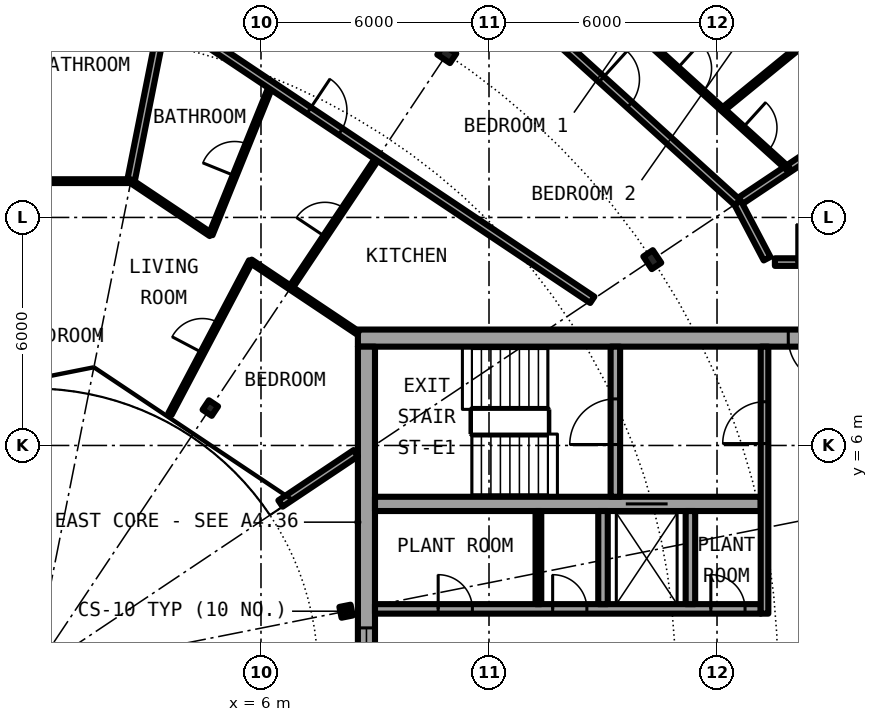
"""IFC4 building model, lengths in metres.
Left out: names, types, materials, properties, quantities, classifications, styles, units other than length and angle.
Written with IfcOpenShell. Run it as: python <this file> out.ifc"""

import sys

from ifc_helpers import new_model, si_unit, direction, frame, frame_2d, origin, origin_2d, place, context, subcontext, project, spatial, rectangle, i_section, extrude, element, fill, save


model = new_model("IFC4")
c1 = context("Model", 3, precision=1e-05, world=origin(), true_north=direction((0.0, 1.0)))
c2 = subcontext(c1, "Body", "Model", "MODEL_VIEW")
j1 = project(units=[si_unit("LENGTHUNIT", "METRE"), si_unit("PLANEANGLEUNIT", "RADIAN")], contexts=[c1])
p1 = place(None, origin())
s1 = spatial("IfcSite", under=j1, at=p1, CompositionType="ELEMENT")
p2 = place(p1, origin())
s2 = spatial("IfcBuilding", under=s1, at=p2, CompositionType="ELEMENT")
p3 = place(p2, frame((0.0, 0.0, 196.3)))
s3 = spatial("IfcBuildingStorey", under=s2, at=p3, CompositionType="ELEMENT", Elevation=196.3)
for number, where, z_axis, x_axis in (
    (1, (16.297, 10.889, 0.0), (0.0, 0.0, 1.0), (0.831, 0.556, 0.0)),
    (2, (10.889, 16.297, 0.0), (0.0, 0.0, 1.0), (0.556, 0.831, 0.0)),
):
    element("IfcColumn", number, at=place(p3, frame(where, z_axis=z_axis, x_axis=x_axis)), inside=s3, PredefinedType="COLUMN", context=c2, shape_type="SweptSolid", body=[
        extrude(i_section(OverallWidth=0.3, OverallDepth=0.4, WebThickness=0.013, FlangeThickness=0.024, FilletRadius=0.027, at=origin_2d()), origin(), (0.0, 0.0, 1.0), 3.05),
    ])
for number, where, z_axis, x_axis in (
    (3, (8.239, 1.639, 0.0), (0.0, 0.0, 1.0), (0.981, 0.195, 0.0)),
    (4, (4.667, 6.984, 0.0), (0.0, 0.0, 1.0), (0.556, 0.831, 0.0)),
):
    element("IfcColumn", number, at=place(p3, frame(where, z_axis=z_axis, x_axis=x_axis)), inside=s3, PredefinedType="COLUMN", context=c2, shape_type="SweptSolid", body=[
        extrude(i_section(OverallWidth=0.3, OverallDepth=0.29, WebThickness=0.009, FlangeThickness=0.014, FilletRadius=0.027, at=origin_2d()), origin(), (0.0, 0.0, 1.0), 3.05),
    ])
p4 = place(p3, frame((22.699, 15.167, 0.0), z_axis=(0.0, 0.0, 1.0), x_axis=(-0.634382322723, 0.773019449054, 0.0)))
e5 = element("IfcWall", 5, at=p4, inside=s3, PredefinedType="SOLIDWALL", context=c2, shape_type="SweptSolid", body=[
    extrude(rectangle(XDim=5.352, YDim=0.25, at=frame_2d((2.676, 0.0))), origin(), (0.0, 0.0, 1.0), 2.7),
])
p5 = place(p4, frame((0.841, 0.0, 0.0)))
e6 = element("IfcOpeningElement", 6, at=p5, cuts=e5, PredefinedType="OPENING", context=c2, shape_type="SweptSolid", body=[
    extrude(rectangle(XDim=1.0, YDim=2.2, at=frame_2d((0.5, 1.1))), frame((0.0, 0.135, 0.0), z_axis=(0.0, -1.0, 0.0), x_axis=(1.0, 0.0, 0.0)), (0.0, 0.0, 1.0), 0.27),
])
p6 = place(p4, frame((3.111, 0.0, 0.3)))
e7 = element("IfcOpeningElement", 7, at=p6, cuts=e5, PredefinedType="OPENING", context=c2, shape_type="SweptSolid", body=[
    extrude(rectangle(XDim=1.8, YDim=2.1, at=frame_2d((0.9, 1.05))), frame((0.0, 0.135, 0.0), z_axis=(0.0, -1.0, 0.0), x_axis=(1.0, 0.0, 0.0)), (0.0, 0.0, 1.0), 0.27),
])
p7 = place(p3, frame((22.05, 8.825, 0.0), z_axis=(0.0, 0.0, 1.0), x_axis=(-1.0, 0.0, 0.0)))
e8 = element("IfcWall", 8, at=p7, inside=s3, PredefinedType="SHEAR", context=c2, shape_type="SweptSolid", body=[
    extrude(rectangle(XDim=13.5, YDim=0.45, at=frame_2d((6.75, 0.0))), origin(), (0.0, 0.0, 1.0), 3.05),
])
p8 = place(p7, frame((0.975, 0.0, 0.0)))
e9 = element("IfcOpeningElement", 9, at=p8, cuts=e8, PredefinedType="OPENING", context=c2, shape_type="SweptSolid", body=[
    extrude(rectangle(XDim=1.2, YDim=2.3, at=frame_2d((0.6, 1.15))), frame((0.0, 0.235, 0.0), z_axis=(0.0, -1.0, 0.0), x_axis=(1.0, 0.0, 0.0)), (0.0, 0.0, 1.0), 0.47),
])
p9 = place(p3, frame((8.775, -8.6, 0.0), z_axis=(0.0, 0.0, 1.0), x_axis=(0.0, 1.0, 0.0)))
e10 = element("IfcWall", 10, at=p9, inside=s3, PredefinedType="SHEAR", context=c2, shape_type="SweptSolid", body=[
    extrude(rectangle(XDim=17.2, YDim=0.45, at=frame_2d((8.6, 0.0))), origin(), (0.0, 0.0, 1.0), 3.05),
])
p10 = place(p9, frame((7.4, 0.0, 0.1)))
e11 = element("IfcOpeningElement", 11, at=p10, cuts=e10, PredefinedType="OPENING", context=c2, shape_type="SweptSolid", body=[
    extrude(rectangle(XDim=2.4, YDim=2.2, at=frame_2d((1.2, 1.1))), frame((0.0, 0.235, 0.0), z_axis=(0.0, -1.0, 0.0), x_axis=(1.0, 0.0, 0.0)), (0.0, 0.0, 1.0), 0.47),
])
p11 = place(p3, frame((9.0, 1.7, 0.0), z_axis=(0.0, 0.0, 1.0), x_axis=(1.0, 0.0, 0.0)))
e12 = element("IfcWall", 12, at=p11, inside=s3, PredefinedType="SHEAR", context=c2, shape_type="SweptSolid", body=[
    extrude(rectangle(XDim=10.15, YDim=0.25, at=frame_2d((5.075, 0.0))), origin(), (0.0, 0.0, 1.0), 3.05),
])
p12 = place(p11, frame((1.663, 0.0, 0.0)))
e13 = element("IfcOpeningElement", 13, at=p12, cuts=e12, PredefinedType="OPENING", context=c2, shape_type="SweptSolid", body=[
    extrude(rectangle(XDim=0.9, YDim=2.3, at=frame_2d((0.45, 1.15))), frame((0.0, 0.135, 0.0), z_axis=(0.0, -1.0, 0.0), x_axis=(1.0, 0.0, 0.0)), (0.0, 0.0, 1.0), 0.27),
])
p13 = place(p11, frame((4.675, 0.0, 0.0)))
e14 = element("IfcOpeningElement", 14, at=p13, cuts=e12, PredefinedType="OPENING", context=c2, shape_type="SweptSolid", body=[
    extrude(rectangle(XDim=0.9, YDim=2.3, at=frame_2d((0.45, 1.15))), frame((0.0, 0.135, 0.0), z_axis=(0.0, -1.0, 0.0), x_axis=(1.0, 0.0, 0.0)), (0.0, 0.0, 1.0), 0.27),
])
p14 = place(p11, frame((8.837, 0.0, 0.0)))
e15 = element("IfcOpeningElement", 15, at=p14, cuts=e12, PredefinedType="OPENING", context=c2, shape_type="SweptSolid", body=[
    extrude(rectangle(XDim=0.9, YDim=2.3, at=frame_2d((0.45, 1.15))), frame((0.0, 0.135, 0.0), z_axis=(0.0, -1.0, 0.0), x_axis=(1.0, 0.0, 0.0)), (0.0, 0.0, 1.0), 0.27),
])
p15 = place(p3, frame((9.0, 4.462, 0.0), z_axis=(0.0, 0.0, 1.0), x_axis=(1.0, 0.0, 0.0)))
e16 = element("IfcWall", 16, at=p15, inside=s3, PredefinedType="SHEAR", context=c2, shape_type="SweptSolid", body=[
    extrude(rectangle(XDim=10.15, YDim=0.375, at=frame_2d((5.075, 0.0))), origin(), (0.0, 0.0, 1.0), 3.05),
])
p16 = place(p15, frame((6.6, 0.0, 0.0)))
e17 = element("IfcOpeningElement", 17, at=p16, cuts=e16, PredefinedType="OPENING", context=c2, shape_type="SweptSolid", body=[
    extrude(rectangle(XDim=1.1, YDim=2.3, at=frame_2d((0.55, 1.15))), frame((0.0, 0.198, 0.0), z_axis=(0.0, -1.0, 0.0), x_axis=(1.0, 0.0, 0.0)), (0.0, 0.0, 1.0), 0.395),
])
p17 = place(p3, frame((15.325, 4.65, 0.0), z_axis=(0.0, 0.0, 1.0), x_axis=(0.0, 1.0, 0.0)))
e18 = element("IfcWall", 18, at=p17, inside=s3, PredefinedType="SHEAR", context=c2, shape_type="SweptSolid", body=[
    extrude(rectangle(XDim=3.95, YDim=0.25, at=frame_2d((1.975, 0.0))), origin(), (0.0, 0.0, 1.0), 3.05),
])
p18 = place(p17, frame((1.375, 0.0, 0.0)))
e19 = element("IfcOpeningElement", 19, at=p18, cuts=e18, PredefinedType="OPENING", context=c2, shape_type="SweptSolid", body=[
    extrude(rectangle(XDim=1.2, YDim=2.3, at=frame_2d((0.6, 1.15))), frame((0.0, 0.135, 0.0), z_axis=(0.0, -1.0, 0.0), x_axis=(1.0, 0.0, 0.0)), (0.0, 0.0, 1.0), 0.27),
])
for number, where, z_axis, x_axis in (
    (20, (15.0, 1.825, 0.0), (0.0, 0.0, 1.0), (0.0, 1.0, 0.0)),
    (21, (17.3, 1.825, 0.0), (0.0, 0.0, 1.0), (0.0, 1.0, 0.0)),
):
    element("IfcWall", number, at=place(p3, frame(where, z_axis=z_axis, x_axis=x_axis)), inside=s3, PredefinedType="SOLIDWALL", context=c2, shape_type="SweptSolid", body=[
        extrude(rectangle(XDim=2.45, YDim=0.25, at=frame_2d((1.225, 0.0))), origin(), (0.0, 0.0, 1.0), 2.7),
    ])
p19 = place(p3, frame((19.25, 1.575, 0.0), z_axis=(0.0, 0.0, 1.0), x_axis=(0.0, 1.0, 0.0)))
e22 = element("IfcWall", 22, at=p19, inside=s3, PredefinedType="SOLIDWALL", context=c2, shape_type="SweptSolid", body=[
    extrude(rectangle(XDim=7.025, YDim=0.2, at=frame_2d((3.513, 0.0))), origin(), (0.0, 0.0, 1.0), 2.7),
])
p20 = place(p19, frame((4.475, 0.0, 0.0)))
e23 = element("IfcOpeningElement", 23, at=p20, cuts=e22, PredefinedType="OPENING", context=c2, shape_type="SweptSolid", body=[
    extrude(rectangle(XDim=1.1, YDim=2.3, at=frame_2d((0.55, 1.15))), frame((0.0, 0.11, 0.0), z_axis=(0.0, -1.0, 0.0), x_axis=(1.0, 0.0, 0.0)), (0.0, 0.0, 1.0), 0.22),
])
p21 = place(p3, frame((13.3, 1.825, 0.0), z_axis=(0.0, 0.0, 1.0), x_axis=(0.0, 1.0, 0.0)))
e24 = element("IfcWall", 24, at=p21, inside=s3, PredefinedType="PARTITIONING", context=c2, shape_type="SweptSolid", body=[
    extrude(rectangle(XDim=2.45, YDim=0.15, at=frame_2d((1.225, 0.0))), origin(), (0.0, 0.0, 1.0), 2.7),
])
p22 = place(p3, frame((2.577, 12.955, 0.0), z_axis=(0.0, 0.0, 1.0), x_axis=(0.195039294963, 0.980795428935, 0.0)))
e25 = element("IfcWall", 25, at=p22, inside=s3, PredefinedType="PARTITIONING", context=c2, shape_type="SweptSolid", body=[
    extrude(rectangle(XDim=4.491, YDim=0.2, at=frame_2d((2.246, 0.0))), origin(), (0.0, 0.0, 1.0), 2.7),
])
p23 = place(p3, frame((3.605, 6.827, 0.0), z_axis=(0.0, 0.0, 1.0), x_axis=(0.466962677975, 0.884277025246, 0.0)))
e26 = element("IfcWall", 26, at=p23, inside=s3, PredefinedType="PARTITIONING", context=c2, shape_type="SweptSolid", body=[
    extrude(rectangle(XDim=4.549, YDim=0.1, at=frame_2d((2.274, 0.0))), origin(), (0.0, 0.0, 1.0), 2.7),
])
p24 = place(p23, frame((1.824, 0.0, 0.0)))
e27 = element("IfcOpeningElement", 27, at=p24, cuts=e26, PredefinedType="OPENING", context=c2, shape_type="SweptSolid", body=[
    extrude(rectangle(XDim=0.9, YDim=2.3, at=frame_2d((0.45, 1.15))), frame((0.0, 0.06, 0.0), z_axis=(0.0, -1.0, 0.0), x_axis=(1.0, 0.0, 0.0)), (0.0, 0.0, 1.0), 0.12),
])
p25 = place(p3, frame((4.678, 11.551, 0.0), z_axis=(0.0, 0.0, 1.0), x_axis=(0.375509828455, 0.926818411952, 0.0)))
e28 = element("IfcWall", 28, at=p25, inside=s3, PredefinedType="PARTITIONING", context=c2, shape_type="SweptSolid", body=[
    extrude(rectangle(XDim=4.237, YDim=0.1, at=frame_2d((2.119, 0.0))), origin(), (0.0, 0.0, 1.0), 2.7),
])
p26 = place(p25, frame((1.669, 0.0, 0.0)))
e29 = element("IfcOpeningElement", 29, at=p26, cuts=e28, PredefinedType="OPENING", context=c2, shape_type="SweptSolid", body=[
    extrude(rectangle(XDim=0.9, YDim=2.3, at=frame_2d((0.45, 1.15))), frame((0.0, 0.06, 0.0), z_axis=(0.0, -1.0, 0.0), x_axis=(1.0, 0.0, 0.0)), (0.0, 0.0, 1.0), 0.12),
])
p27 = place(p3, frame((6.78, 10.147, 0.0), z_axis=(0.0, 0.0, 1.0), x_axis=(0.555528237031, 0.831497671591, 0.0)))
e30 = element("IfcWall", 30, at=p27, inside=s3, PredefinedType="PARTITIONING", context=c2, shape_type="SweptSolid", body=[
    extrude(rectangle(XDim=4.149, YDim=0.1, at=frame_2d((2.075, 0.0))), origin(), (0.0, 0.0, 1.0), 2.7),
])
p28 = place(p27, frame((1.625, 0.0, 0.0)))
e31 = element("IfcOpeningElement", 31, at=p28, cuts=e30, PredefinedType="OPENING", context=c2, shape_type="SweptSolid", body=[
    extrude(rectangle(XDim=0.9, YDim=2.3, at=frame_2d((0.45, 1.15))), frame((0.0, 0.06, 0.0), z_axis=(0.0, -1.0, 0.0), x_axis=(1.0, 0.0, 0.0)), (0.0, 0.0, 1.0), 0.12),
])
p29 = place(p3, frame((18.151, 14.838, 0.0), z_axis=(0.0, 0.0, 1.0), x_axis=(0.774321581607, 0.63279229472, 0.0)))
e32 = element("IfcWall", 32, at=p29, inside=s3, PredefinedType="PARTITIONING", context=c2, shape_type="SweptSolid", body=[
    extrude(rectangle(XDim=3.731, YDim=0.1, at=frame_2d((1.866, 0.0))), origin(), (0.0, 0.0, 1.0), 2.7),
])
p30 = place(p3, frame((18.542, 12.389, 0.0), z_axis=(0.0, 0.0, 1.0), x_axis=(0.831387096605, 0.55569370664, 0.0)))
e33 = element("IfcWall", 33, at=p30, inside=s3, PredefinedType="PARTITIONING", context=c2, shape_type="SweptSolid", body=[
    extrude(rectangle(XDim=4.875, YDim=0.2, at=frame_2d((2.438, 0.0))), origin(), (0.0, 0.0, 1.0), 2.7),
])
p31 = place(p3, frame((6.513, 4.472, 0.0), z_axis=(0.0, 0.0, 1.0), x_axis=(0.831403409976, 0.555669299026, 0.0)))
e34 = element("IfcWall", 34, at=p31, inside=s3, PredefinedType="PARTITIONING", context=c2, shape_type="SweptSolid", body=[
    extrude(rectangle(XDim=2.383, YDim=0.2, at=frame_2d((1.191, 0.0))), origin(), (0.0, 0.0, 1.0), 2.7),
])
p32 = place(p3, frame((19.523, 10.825, 0.0), z_axis=(0.0, 0.0, 1.0), x_axis=(1.0, 0.0, 0.0)))
e35 = element("IfcWall", 35, at=p32, inside=s3, PredefinedType="PARTITIONING", context=c2, shape_type="SweptSolid", body=[
    extrude(rectangle(XDim=2.152, YDim=0.2, at=frame_2d((1.076, 0.0))), origin(), (0.0, 0.0, 1.0), 2.7),
])
p33 = place(p32, frame((0.576, 0.0, 0.0)))
e36 = element("IfcOpeningElement", 36, at=p33, cuts=e35, PredefinedType="OPENING", context=c2, shape_type="SweptSolid", body=[
    extrude(rectangle(XDim=1.0, YDim=2.3, at=frame_2d((0.5, 1.15))), frame((0.0, 0.11, 0.0), z_axis=(0.0, -1.0, 0.0), x_axis=(1.0, 0.0, 0.0)), (0.0, 0.0, 1.0), 0.22),
])
p34 = place(p3, frame((2.577, 12.955, 0.0), z_axis=(0.0, 0.0, 1.0), x_axis=(0.831440395268, -0.555613956912, 0.0)))
e37 = element("IfcWall", 37, at=p34, inside=s3, PredefinedType="PARTITIONING", context=c2, shape_type="SweptSolid", body=[
    extrude(rectangle(XDim=2.527, YDim=0.1, at=frame_2d((1.264, 0.0))), origin(), (0.0, 0.0, 1.0), 2.7),
])
p35 = place(p3, frame((5.729, 10.849, 0.0), z_axis=(0.0, 0.0, 1.0), x_axis=(0.83129689803, -0.555828631257, 0.0)))
e38 = element("IfcWall", 38, at=p35, inside=s3, PredefinedType="PARTITIONING", context=c2, shape_type="SweptSolid", body=[
    extrude(rectangle(XDim=3.394, YDim=0.1, at=frame_2d((1.697, 0.0))), origin(), (0.0, 0.0, 1.0), 2.7),
])
p36 = place(p3, frame((3.453, 17.36, 0.0), z_axis=(0.0, 0.0, 1.0), x_axis=(0.831437137577, -0.555618831806, 0.0)))
e39 = element("IfcWall", 39, at=p36, inside=s3, PredefinedType="PARTITIONING", context=c2, shape_type="SweptSolid", body=[
    extrude(rectangle(XDim=13.549, YDim=0.2, at=frame_2d((6.774, 0.0))), origin(), (0.0, 0.0, 1.0), 2.7),
])
p37 = place(p36, frame((4.581, 0.0, 0.0)))
e40 = element("IfcOpeningElement", 40, at=p37, cuts=e39, PredefinedType="OPENING", context=c2, shape_type="SweptSolid", body=[
    extrude(rectangle(XDim=1.0, YDim=2.3, at=frame_2d((0.5, 1.15))), frame((0.0, 0.11, 0.0), z_axis=(0.0, -1.0, 0.0), x_axis=(1.0, 0.0, 0.0)), (0.0, 0.0, 1.0), 0.22),
])
p38 = place(p3, frame((10.512, 19.667, 0.0), z_axis=(0.0, 0.0, 1.0), x_axis=(0.740849323054, -0.67167125927, 0.0)))
e41 = element("IfcWall", 41, at=p38, inside=s3, PredefinedType="PARTITIONING", context=c2, shape_type="SweptSolid", body=[
    extrude(rectangle(XDim=10.842, YDim=0.2, at=frame_2d((5.421, 0.0))), origin(), (0.0, 0.0, 1.0), 2.7),
])
p39 = place(p38, frame((6.003, 0.0, 0.0)))
e42 = element("IfcOpeningElement", 42, at=p39, cuts=e41, PredefinedType="OPENING", context=c2, shape_type="SweptSolid", body=[
    extrude(rectangle(XDim=1.0, YDim=2.3, at=frame_2d((0.5, 1.15))), frame((0.0, 0.11, 0.0), z_axis=(0.0, -1.0, 0.0), x_axis=(1.0, 0.0, 0.0)), (0.0, 0.0, 1.0), 0.22),
])
p40 = place(p3, frame((18.542, 12.389, 0.0), z_axis=(0.0, 0.0, 1.0), x_axis=(0.465359652486, -0.885121683068, 0.0)))
e43 = element("IfcWall", 43, at=p40, inside=s3, PredefinedType="PARTITIONING", context=c2, shape_type="SweptSolid", body=[
    extrude(rectangle(XDim=1.665, YDim=0.2, at=frame_2d((0.833, 0.0))), origin(), (0.0, 0.0, 1.0), 2.7),
])
p41 = place(p3, frame((14.709, 17.958, 0.0), z_axis=(0.0, 0.0, 1.0), x_axis=(0.740923753351, -0.671589153962, 0.0)))
e44 = element("IfcWall", 44, at=p41, inside=s3, PredefinedType="PARTITIONING", context=c2, shape_type="SweptSolid", body=[
    extrude(rectangle(XDim=6.969, YDim=0.1, at=frame_2d((3.484, 0.0))), origin(), (0.0, 0.0, 1.0), 2.7),
])
p42 = place(p41, frame((3.034, 0.0, 0.0)))
e45 = element("IfcOpeningElement", 45, at=p42, cuts=e44, PredefinedType="OPENING", context=c2, shape_type="SweptSolid", body=[
    extrude(rectangle(XDim=0.9, YDim=2.3, at=frame_2d((0.45, 1.15))), frame((0.0, 0.06, 0.0), z_axis=(0.0, -1.0, 0.0), x_axis=(1.0, 0.0, 0.0)), (0.0, 0.0, 1.0), 0.12),
])
p43 = place(p41, frame((5.357, 0.0, 0.0)))
e46 = element("IfcOpeningElement", 46, at=p43, cuts=e44, PredefinedType="OPENING", context=c2, shape_type="SweptSolid", body=[
    extrude(rectangle(XDim=0.9, YDim=2.3, at=frame_2d((0.45, 1.15))), frame((0.0, 0.06, 0.0), z_axis=(0.0, -1.0, 0.0), x_axis=(1.0, 0.0, 0.0)), (0.0, 0.0, 1.0), 0.12),
])
p44 = place(p3, frame((2.557, 12.955, 0.0), z_axis=(0.0, 0.0, 1.0), x_axis=(-1.0, 0.0, 0.0)))
e47 = element("IfcWall", 47, at=p44, inside=s3, PredefinedType="PARTITIONING", context=c2, shape_type="SweptSolid", body=[
    extrude(rectangle(XDim=2.537, YDim=0.1, at=frame_2d((1.269, 0.0))), origin(), (0.0, 0.0, 1.0), 2.7),
])
p45 = place(p16, origin())
e48 = element("IfcDoor", 48, at=p45, inside=s3, OperationType="DOUBLE_DOOR_SLIDING", PredefinedType="DOOR", context=c2, shape_type="SweptSolid", body=[
    extrude(rectangle(XDim=1.1, YDim=2.3, at=frame_2d((0.55, 1.15))), frame((0.0, 0.025, 0.0), z_axis=(0.0, -1.0, 0.0), x_axis=(1.0, 0.0, 0.0)), (0.0, 0.0, 1.0), 0.05),
])
fill(e17, e48)
p46 = place(p12, origin())
e49 = element("IfcDoor", 49, at=p46, inside=s3, OperationType="SINGLE_SWING_RIGHT", PredefinedType="DOOR", context=c2, shape_type="SweptSolid", body=[
    extrude(rectangle(XDim=0.9, YDim=2.3, at=frame_2d((0.45, 1.15))), frame((0.0, 0.025, 0.0), z_axis=(0.0, -1.0, 0.0), x_axis=(1.0, 0.0, 0.0)), (0.0, 0.0, 1.0), 0.05),
])
fill(e13, e49)
p47 = place(p13, origin())
e50 = element("IfcDoor", 50, at=p47, inside=s3, OperationType="SINGLE_SWING_LEFT", PredefinedType="DOOR", context=c2, shape_type="SweptSolid", body=[
    extrude(rectangle(XDim=0.9, YDim=2.3, at=frame_2d((0.45, 1.15))), frame((0.0, 0.025, 0.0), z_axis=(0.0, -1.0, 0.0), x_axis=(1.0, 0.0, 0.0)), (0.0, 0.0, 1.0), 0.05),
])
fill(e14, e50)
p48 = place(p14, origin())
e51 = element("IfcDoor", 51, at=p48, inside=s3, OperationType="SINGLE_SWING_LEFT", PredefinedType="DOOR", context=c2, shape_type="SweptSolid", body=[
    extrude(rectangle(XDim=0.9, YDim=2.3, at=frame_2d((0.45, 1.15))), frame((0.0, 0.025, 0.0), z_axis=(0.0, -1.0, 0.0), x_axis=(1.0, 0.0, 0.0)), (0.0, 0.0, 1.0), 0.05),
])
fill(e15, e51)
p49 = place(p18, origin())
e52 = element("IfcDoor", 52, at=p49, inside=s3, OperationType="SINGLE_SWING_LEFT", PredefinedType="DOOR", context=c2, shape_type="SweptSolid", body=[
    extrude(rectangle(XDim=1.2, YDim=2.3, at=frame_2d((0.6, 1.15))), frame((0.0, 0.025, 0.0), z_axis=(0.0, -1.0, 0.0), x_axis=(1.0, 0.0, 0.0)), (0.0, 0.0, 1.0), 0.05),
])
fill(e19, e52)
p50 = place(p20, origin())
e53 = element("IfcDoor", 53, at=p50, inside=s3, OperationType="SINGLE_SWING_LEFT", PredefinedType="DOOR", context=c2, shape_type="SweptSolid", body=[
    extrude(rectangle(XDim=1.1, YDim=2.3, at=frame_2d((0.55, 1.15))), frame((0.0, 0.025, 0.0), z_axis=(0.0, -1.0, 0.0), x_axis=(1.0, 0.0, 0.0)), (0.0, 0.0, 1.0), 0.05),
])
fill(e23, e53)
p51 = place(p8, origin())
e54 = element("IfcDoor", 54, at=p51, inside=s3, OperationType="SINGLE_SWING_RIGHT", PredefinedType="DOOR", context=c2, shape_type="SweptSolid", body=[
    extrude(rectangle(XDim=1.2, YDim=2.3, at=frame_2d((0.6, 1.15))), frame((0.0, 0.025, 0.0), z_axis=(0.0, -1.0, 0.0), x_axis=(1.0, 0.0, 0.0)), (0.0, 0.0, 1.0), 0.05),
])
fill(e9, e54)
p52 = place(p10, origin())
e55 = element("IfcWindow", 55, at=p52, inside=s3, PartitioningType="SINGLE_PANEL", PredefinedType="WINDOW", context=c2, shape_type="SweptSolid", body=[
    extrude(rectangle(XDim=2.4, YDim=2.2, at=frame_2d((1.2, 1.1))), frame((0.0, 0.03, 0.0), z_axis=(0.0, -1.0, 0.0), x_axis=(1.0, 0.0, 0.0)), (0.0, 0.0, 1.0), 0.06),
])
fill(e11, e55)
p53 = place(p39, origin())
e56 = element("IfcDoor", 56, at=p53, inside=s3, OperationType="SINGLE_SWING_RIGHT", PredefinedType="DOOR", context=c2, shape_type="SweptSolid", body=[
    extrude(rectangle(XDim=1.0, YDim=2.3, at=frame_2d((0.5, 1.15))), frame((0.0, 0.025, 0.0), z_axis=(0.0, -1.0, 0.0), x_axis=(1.0, 0.0, 0.0)), (0.0, 0.0, 1.0), 0.05),
])
fill(e42, e56)
p54 = place(p42, origin())
e57 = element("IfcDoor", 57, at=p54, inside=s3, OperationType="SINGLE_SWING_LEFT", PredefinedType="DOOR", context=c2, shape_type="SweptSolid", body=[
    extrude(rectangle(XDim=0.9, YDim=2.3, at=frame_2d((0.45, 1.15))), frame((0.0, 0.025, 0.0), z_axis=(0.0, -1.0, 0.0), x_axis=(1.0, 0.0, 0.0)), (0.0, 0.0, 1.0), 0.05),
])
fill(e45, e57)
p55 = place(p43, origin())
e58 = element("IfcDoor", 58, at=p55, inside=s3, OperationType="SINGLE_SWING_RIGHT", PredefinedType="DOOR", context=c2, shape_type="SweptSolid", body=[
    extrude(rectangle(XDim=0.9, YDim=2.3, at=frame_2d((0.45, 1.15))), frame((0.0, 0.025, 0.0), z_axis=(0.0, -1.0, 0.0), x_axis=(1.0, 0.0, 0.0)), (0.0, 0.0, 1.0), 0.05),
])
fill(e46, e58)
p56 = place(p37, origin())
e59 = element("IfcDoor", 59, at=p56, inside=s3, OperationType="SINGLE_SWING_LEFT", PredefinedType="DOOR", context=c2, shape_type="SweptSolid", body=[
    extrude(rectangle(XDim=1.0, YDim=2.3, at=frame_2d((0.5, 1.15))), frame((0.0, 0.025, 0.0), z_axis=(0.0, -1.0, 0.0), x_axis=(1.0, 0.0, 0.0)), (0.0, 0.0, 1.0), 0.05),
])
fill(e40, e59)
p57 = place(p26, origin())
e60 = element("IfcDoor", 60, at=p57, inside=s3, OperationType="SINGLE_SWING_RIGHT", PredefinedType="DOOR", context=c2, shape_type="SweptSolid", body=[
    extrude(rectangle(XDim=0.9, YDim=2.3, at=frame_2d((0.45, 1.15))), frame((0.0, 0.025, 0.0), z_axis=(0.0, -1.0, 0.0), x_axis=(1.0, 0.0, 0.0)), (0.0, 0.0, 1.0), 0.05),
])
fill(e29, e60)
p58 = place(p28, origin())
e61 = element("IfcDoor", 61, at=p58, inside=s3, OperationType="SINGLE_SWING_RIGHT", PredefinedType="DOOR", context=c2, shape_type="SweptSolid", body=[
    extrude(rectangle(XDim=0.9, YDim=2.3, at=frame_2d((0.45, 1.15))), frame((0.0, 0.025, 0.0), z_axis=(0.0, -1.0, 0.0), x_axis=(1.0, 0.0, 0.0)), (0.0, 0.0, 1.0), 0.05),
])
fill(e31, e61)
p59 = place(p24, origin())
e62 = element("IfcDoor", 62, at=p59, inside=s3, OperationType="SINGLE_SWING_LEFT", PredefinedType="DOOR", context=c2, shape_type="SweptSolid", body=[
    extrude(rectangle(XDim=0.9, YDim=2.3, at=frame_2d((0.45, 1.15))), frame((0.0, 0.025, 0.0), z_axis=(0.0, -1.0, 0.0), x_axis=(1.0, 0.0, 0.0)), (0.0, 0.0, 1.0), 0.05),
])
fill(e27, e62)
p60 = place(p33, origin())
e63 = element("IfcDoor", 63, at=p60, inside=s3, OperationType="SINGLE_SWING_LEFT", PredefinedType="DOOR", context=c2, shape_type="SweptSolid", body=[
    extrude(rectangle(XDim=1.0, YDim=2.3, at=frame_2d((0.5, 1.15))), frame((0.0, 0.025, 0.0), z_axis=(0.0, -1.0, 0.0), x_axis=(1.0, 0.0, 0.0)), (0.0, 0.0, 1.0), 0.05),
])
fill(e36, e63)
save(model, sys.argv[1])
